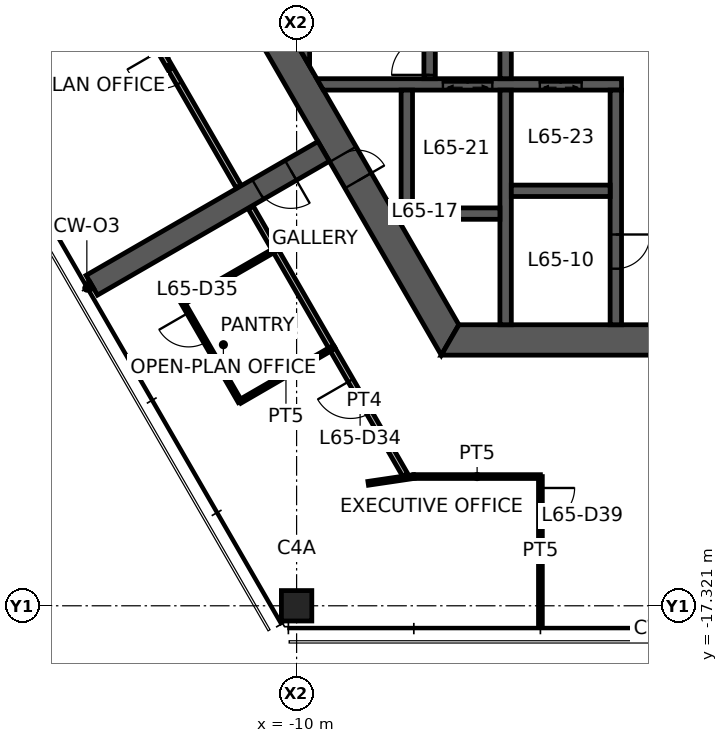
"""IFC4 building model, lengths in metres.
Left out: names, types, materials, properties, quantities, classifications, styles, units other than length and angle.
Written with IfcOpenShell. Run it as: python <this file> out.ifc"""

import sys

from ifc_helpers import new_model, si_unit, direction, frame, frame_2d, origin, origin_2d, place, context, subcontext, project, spatial, polyline, rectangle, hollow_rectangle, outline, extrude, element, fill, save


model = new_model("IFC4")
c1 = context("Model", 3, precision=1e-05, world=origin(), true_north=direction((0.0, 1.0)))
c2 = subcontext(c1, "Body", "Model", "MODEL_VIEW")
j1 = project(units=[si_unit("LENGTHUNIT", "METRE"), si_unit("PLANEANGLEUNIT", "RADIAN")], contexts=[c1])
p1 = place(None, origin())
s1 = spatial("IfcSite", under=j1, at=p1, CompositionType="ELEMENT")
p2 = place(p1, origin())
s2 = spatial("IfcBuilding", under=s1, at=p2, CompositionType="ELEMENT")
p3 = place(p2, frame((0.0, 0.0, 259.6)))
s3 = spatial("IfcBuildingStorey", under=s2, at=p3, CompositionType="ELEMENT", Elevation=259.6)
p4 = place(p3, frame((-10.0, -17.321, 0.0), z_axis=(0.0, 0.0, 1.0), x_axis=(1.0, 0.0, 0.0)))
e1 = element("IfcColumn", 1, at=p4, inside=s3, PredefinedType="COLUMN", context=c2, shape_type="SweptSolid", body=[
    extrude(hollow_rectangle(XDim=0.8, YDim=0.8, WallThickness=0.04, at=origin_2d()), origin(), (0.0, 0.0, 1.0), 3.9),
])
p5 = place(p3, frame((-11.922, 0.0, 0.0), z_axis=(0.0, 0.0, 1.0), x_axis=(0.500004296715, -0.866022923061, 0.0)))
e2 = element("IfcWall", 2, at=p5, inside=s3, PredefinedType="SHEAR", context=c2, shape_type="SweptSolid", body=[
    extrude(outline(polyline([(-0.231, -0.4), (6.281, -0.4), (7.081, -0.4), (12.153, -0.4), (11.691, 0.4), (7.081, 0.4), (6.281, 0.4), (0.231, 0.4), (-0.231, -0.4)])), origin(), (0.0, 0.0, 1.0), 3.9),
])
p6 = place(p5, frame((6.281, 0.0, 0.0)))
e3 = element("IfcOpeningElement", 3, at=p6, cuts=e2, PredefinedType="OPENING", context=c2, shape_type="SweptSolid", body=[
    extrude(rectangle(XDim=0.8, YDim=2.1, at=frame_2d((0.4, 1.05))), frame((0.0, 0.41, 0.0), z_axis=(0.0, -1.0, 0.0), x_axis=(1.0, 0.0, 0.0)), (0.0, 0.0, 1.0), 0.82),
])
p7 = place(p3, frame((-5.961, -10.325, 0.0), z_axis=(0.0, 0.0, 1.0), x_axis=(1.0, 0.0, 0.0)))
e4 = element("IfcWall", 4, at=p7, inside=s3, PredefinedType="SHEAR", context=c2, shape_type="SweptSolid", body=[
    extrude(outline(polyline([(-0.231, -0.4), (5.461, -0.4), (6.461, -0.4), (12.153, -0.4), (11.691, 0.4), (6.461, 0.4), (5.461, 0.4), (0.231, 0.4), (-0.231, -0.4)])), origin(), (0.0, 0.0, 1.0), 3.9),
])
p8 = place(p7, frame((5.461, 0.0, 0.0)))
e5 = element("IfcOpeningElement", 5, at=p8, cuts=e4, PredefinedType="OPENING", context=c2, shape_type="SweptSolid", body=[
    extrude(rectangle(XDim=1.0, YDim=2.1, at=frame_2d((0.5, 1.05))), frame((0.0, 0.41, 0.0), z_axis=(0.0, -1.0, 0.0), x_axis=(1.0, 0.0, 0.0)), (0.0, 0.0, 1.0), 0.82),
])
p9 = place(p3, frame((-9.288, -5.363, 0.0), z_axis=(0.0, 0.0, 1.0), x_axis=(-0.866027473358, -0.499996415376, 0.0)))
e6 = element("IfcWall", 6, at=p9, inside=s3, PredefinedType="SHEAR", context=c2, shape_type="SweptSolid", body=[
    extrude(rectangle(XDim=7.045, YDim=0.6, at=frame_2d((3.523, 0.0))), origin(), (0.0, 0.0, 1.0), 3.9),
])
p10 = place(p9, frame((1.0, 0.0, 0.0)))
e7 = element("IfcOpeningElement", 7, at=p10, cuts=e6, PredefinedType="OPENING", context=c2, shape_type="SweptSolid", body=[
    extrude(rectangle(XDim=1.0, YDim=2.1, at=frame_2d((0.5, 1.05))), frame((0.0, 0.31, 0.0), z_axis=(0.0, -1.0, 0.0), x_axis=(1.0, 0.0, 0.0)), (0.0, 0.0, 1.0), 0.62),
])
p11 = place(p3, frame((-9.382, -3.6, 0.0), z_axis=(0.0, 0.0, 1.0), x_axis=(1.0, 0.0, 0.0)))
e8 = element("IfcWall", 8, at=p11, inside=s3, PredefinedType="SHEAR", context=c2, shape_type="SweptSolid", body=[
    extrude(outline(polyline([(0.087, -0.15), (3.232, -0.15), (4.532, -0.15), (5.782, -0.15), (6.882, -0.15), (7.932, -0.15), (7.932, 0.15), (6.882, 0.15), (5.782, 0.15), (4.532, 0.15), (3.232, 0.15), (-0.087, 0.15), (0.087, -0.15)])), origin(), (0.0, 0.0, 1.0), 3.9),
])
p12 = place(p11, frame((5.782, 0.0, 0.0)))
e9 = element("IfcOpeningElement", 9, at=p12, cuts=e8, PredefinedType="OPENING", context=c2, shape_type="SweptSolid", body=[
    extrude(rectangle(XDim=1.1, YDim=2.1, at=frame_2d((0.55, 1.05))), frame((0.0, 0.16, 0.0), z_axis=(0.0, -1.0, 0.0), x_axis=(1.0, 0.0, 0.0)), (0.0, 0.0, 1.0), 0.32),
])
p13 = place(p11, frame((3.232, 0.0, 0.0)))
e10 = element("IfcOpeningElement", 10, at=p13, cuts=e8, PredefinedType="OPENING", context=c2, shape_type="SweptSolid", body=[
    extrude(rectangle(XDim=1.3, YDim=2.1, at=frame_2d((0.65, 1.05))), frame((0.0, 0.16, 0.0), z_axis=(0.0, -1.0, 0.0), x_axis=(1.0, 0.0, 0.0)), (0.0, 0.0, 1.0), 0.32),
])
p14 = place(p3, frame((-1.6, -3.75, 0.0), z_axis=(0.0, 0.0, 1.0), x_axis=(0.0, -1.0, 0.0)))
e11 = element("IfcWall", 11, at=p14, inside=s3, PredefinedType="SHEAR", context=c2, shape_type="SweptSolid", body=[
    extrude(rectangle(XDim=6.175, YDim=0.3, at=frame_2d((3.087, 0.0))), origin(), (0.0, 0.0, 1.0), 3.9),
])
p15 = place(p14, frame((3.8, 0.0, 0.0)))
e12 = element("IfcOpeningElement", 12, at=p15, cuts=e11, PredefinedType="OPENING", context=c2, shape_type="SweptSolid", body=[
    extrude(rectangle(XDim=0.9, YDim=2.1, at=frame_2d((0.45, 1.05))), frame((0.0, 0.16, 0.0), z_axis=(0.0, -1.0, 0.0), x_axis=(1.0, 0.0, 0.0)), (0.0, 0.0, 1.0), 0.32),
])
p16 = place(p3, frame((-4.5, -3.45, 0.0), z_axis=(0.0, 0.0, 1.0), x_axis=(0.0, 1.0, 0.0)))
e13 = element("IfcWall", 13, at=p16, inside=s3, PredefinedType="SHEAR", context=c2, shape_type="SweptSolid", body=[
    extrude(rectangle(XDim=6.9, YDim=0.3, at=frame_2d((3.45, 0.0))), origin(), (0.0, 0.0, 1.0), 3.9),
])
p17 = place(p16, frame((2.95, 0.0, 0.0)))
e14 = element("IfcOpeningElement", 14, at=p17, cuts=e13, PredefinedType="OPENING", context=c2, shape_type="SweptSolid", body=[
    extrude(rectangle(XDim=1.0, YDim=2.1, at=frame_2d((0.5, 1.05))), frame((0.0, 0.16, 0.0), z_axis=(0.0, -1.0, 0.0), x_axis=(1.0, 0.0, 0.0)), (0.0, 0.0, 1.0), 0.32),
])
p18 = place(p3, frame((-6.5, -3.45, 0.0), z_axis=(0.0, 0.0, 1.0), x_axis=(0.0, 1.0, 0.0)))
e15 = element("IfcWall", 15, at=p18, inside=s3, PredefinedType="SHEAR", context=c2, shape_type="SweptSolid", body=[
    extrude(rectangle(XDim=6.9, YDim=0.3, at=frame_2d((3.45, 0.0))), origin(), (0.0, 0.0, 1.0), 3.9),
])
p19 = place(p18, frame((0.1, 0.0, 0.0)))
e16 = element("IfcOpeningElement", 16, at=p19, cuts=e15, PredefinedType="OPENING", context=c2, shape_type="SweptSolid", body=[
    extrude(rectangle(XDim=1.0, YDim=2.1, at=frame_2d((0.5, 1.05))), frame((0.0, 0.16, 0.0), z_axis=(0.0, -1.0, 0.0), x_axis=(1.0, 0.0, 0.0)), (0.0, 0.0, 1.0), 0.32),
])
p20 = place(p3, frame((-4.5, -3.75, 0.0), z_axis=(0.0, 0.0, 1.0), x_axis=(0.0, -1.0, 0.0)))
e17 = element("IfcWall", 17, at=p20, inside=s3, PredefinedType="SHEAR", context=c2, shape_type="SweptSolid", body=[
    extrude(rectangle(XDim=6.175, YDim=0.3, at=frame_2d((3.087, 0.0))), origin(), (0.0, 0.0, 1.0), 3.9),
])
for number, where, z_axis, x_axis in (
    (18, (-4.35, -6.4, 0.0), (0.0, 0.0, 1.0), (1.0, 0.0, 0.0)),
    (19, (-7.25, -7.0, 0.0), (0.0, 0.0, 1.0), (1.0, 0.0, 0.0)),
):
    element("IfcWall", number, at=place(p3, frame(where, z_axis=z_axis, x_axis=x_axis)), inside=s3, PredefinedType="SHEAR", context=c2, shape_type="SweptSolid", body=[
        extrude(rectangle(XDim=2.6, YDim=0.3, at=frame_2d((1.3, 0.0))), origin(), (0.0, 0.0, 1.0), 3.9),
    ])
p21 = place(p3, frame((-7.1, -3.75, 0.0), z_axis=(0.0, 0.0, 1.0), x_axis=(0.0, -1.0, 0.0)))
e20 = element("IfcWall", 20, at=p21, inside=s3, PredefinedType="SHEAR", context=c2, shape_type="SweptSolid", body=[
    extrude(rectangle(XDim=3.1, YDim=0.3, at=frame_2d((1.55, 0.0))), origin(), (0.0, 0.0, 1.0), 3.9),
])
p22 = place(p3, frame((-9.808, -2.862, 0.0), z_axis=(0.0, 0.0, 1.0), x_axis=(0.0, 1.0, 0.0)))
e21 = element("IfcWall", 21, at=p22, inside=s3, PredefinedType="SHEAR", context=c2, shape_type="SweptSolid", body=[
    extrude(outline(polyline([(-0.26, -0.15), (5.984, -0.15), (5.465, 0.15), (0.26, 0.15), (-0.26, -0.15)])), origin(), (0.0, 0.0, 1.0), 3.9),
])
p23 = place(p3, frame((-11.527, -6.285, 0.0), z_axis=(0.0, 0.0, 1.0), x_axis=(-0.500002959843, 0.866023694911, 0.0)))
e22 = element("IfcWall", 22, at=p23, inside=s3, PredefinedType="PARTITIONING", context=c2, shape_type="SweptSolid", body=[
    extrude(rectangle(XDim=7.258, YDim=0.15, at=frame_2d((3.629, 0.0))), origin(), (0.0, 0.0, 1.0), 2.95),
])
p24 = place(p23, frame((3.129, 0.0, 0.0)))
e23 = element("IfcOpeningElement", 23, at=p24, cuts=e22, PredefinedType="OPENING", context=c2, shape_type="SweptSolid", body=[
    extrude(rectangle(XDim=1.0, YDim=2.1, at=frame_2d((0.5, 1.05))), frame((0.0, 0.085, 0.0), z_axis=(0.0, -1.0, 0.0), x_axis=(1.0, 0.0, 0.0)), (0.0, 0.0, 1.0), 0.17),
])
p25 = place(p3, frame((-9.064, -10.551, 0.0), z_axis=(0.0, 0.0, 1.0), x_axis=(-0.499977562641, 0.866038357612, 0.0)))
e24 = element("IfcWall", 24, at=p25, inside=s3, PredefinedType="PARTITIONING", context=c2, shape_type="SweptSolid", body=[
    extrude(rectangle(XDim=3.01, YDim=0.15, at=frame_2d((1.505, 0.0))), origin(), (0.0, 0.0, 1.0), 2.95),
])
p26 = place(p3, frame((-10.564, -7.952, 0.0), z_axis=(0.0, 0.0, 1.0), x_axis=(-0.500084415177, 0.865976661173, 0.0)))
e25 = element("IfcWall", 25, at=p26, inside=s3, PredefinedType="PARTITIONING", context=c2, shape_type="SweptSolid", body=[
    extrude(rectangle(XDim=1.284, YDim=0.15, at=frame_2d((0.642, 0.0))), origin(), (0.0, 0.0, 1.0), 2.95),
])
p27 = place(p3, frame((-7.144, -13.876, 0.0), z_axis=(0.0, 0.0, 1.0), x_axis=(-0.499993312796, 0.866029264609, 0.0)))
e26 = element("IfcWall", 26, at=p27, inside=s3, PredefinedType="PARTITIONING", context=c2, shape_type="SweptSolid", body=[
    extrude(rectangle(XDim=3.849, YDim=0.15, at=frame_2d((1.925, 0.0))), origin(), (0.0, 0.0, 1.0), 2.95),
])
p28 = place(p27, frame((1.869, 0.0, 0.0)))
e27 = element("IfcOpeningElement", 27, at=p28, cuts=e26, PredefinedType="OPENING", context=c2, shape_type="SweptSolid", body=[
    extrude(rectangle(XDim=1.0, YDim=2.1, at=frame_2d((0.5, 1.05))), frame((0.0, 0.085, 0.0), z_axis=(0.0, -1.0, 0.0), x_axis=(1.0, 0.0, 0.0)), (0.0, 0.0, 1.0), 0.17),
])
p29 = place(p3, frame((-12.991, -9.348, 0.0), z_axis=(0.0, 0.0, 1.0), x_axis=(0.866817750494, 0.498625097071, 0.0)))
e28 = element("IfcWall", 28, at=p29, inside=s3, PredefinedType="PARTITIONING", context=c2, shape_type="SweptSolid", body=[
    extrude(rectangle(XDim=2.8, YDim=0.1, at=frame_2d((1.4, 0.0))), origin(), (0.0, 0.0, 1.0), 2.95),
])
p30 = place(p3, frame((-11.491, -11.946, 0.0), z_axis=(0.0, 0.0, 1.0), x_axis=(-0.499990139034, 0.866031096941, 0.0)))
e29 = element("IfcWall", 29, at=p30, inside=s3, PredefinedType="PARTITIONING", context=c2, shape_type="SweptSolid", body=[
    extrude(rectangle(XDim=3.0, YDim=0.1, at=frame_2d((1.5, 0.0))), origin(), (0.0, 0.0, 1.0), 2.95),
])
p31 = place(p30, frame((1.8, 0.0, 0.0)))
e30 = element("IfcOpeningElement", 30, at=p31, cuts=e29, PredefinedType="OPENING", context=c2, shape_type="SweptSolid", body=[
    extrude(rectangle(XDim=0.9, YDim=2.1, at=frame_2d((0.45, 1.05))), frame((0.0, 0.06, 0.0), z_axis=(0.0, -1.0, 0.0), x_axis=(1.0, 0.0, 0.0)), (0.0, 0.0, 1.0), 0.12),
])
p32 = place(p3, frame((-9.069, -10.542, 0.0), z_axis=(0.0, 0.0, 1.0), x_axis=(-0.865195372903, -0.501434907746, 0.0)))
e31 = element("IfcWall", 31, at=p32, inside=s3, PredefinedType="PARTITIONING", context=c2, shape_type="SweptSolid", body=[
    extrude(rectangle(XDim=2.8, YDim=0.1, at=frame_2d((1.4, 0.0))), origin(), (0.0, 0.0, 1.0), 2.95),
])
p33 = place(p3, frame((-8.116, -14.098, 0.0), z_axis=(0.0, 0.0, 1.0), x_axis=(0.989162387444, 0.146825649214, 0.0)))
e32 = element("IfcWall", 32, at=p33, inside=s3, PredefinedType="PARTITIONING", context=c2, shape_type="SweptSolid", body=[
    extrude(rectangle(XDim=1.214, YDim=0.1, at=frame_2d((0.607, 0.0))), origin(), (0.0, 0.0, 1.0), 2.95),
])
p34 = place(p3, frame((-6.916, -13.919, 0.0), z_axis=(0.0, 0.0, 1.0), x_axis=(0.999999957026, -0.000293169146, 0.0)))
e33 = element("IfcWall", 33, at=p34, inside=s3, PredefinedType="PARTITIONING", context=c2, shape_type="SweptSolid", body=[
    extrude(rectangle(XDim=3.331, YDim=0.1, at=frame_2d((1.666, 0.0))), origin(), (0.0, 0.0, 1.0), 2.95),
])
p35 = place(p3, frame((-3.584, -13.92, 0.0), z_axis=(0.0, 0.0, 1.0), x_axis=(0.0, -1.0, 0.0)))
e34 = element("IfcWall", 34, at=p35, inside=s3, PredefinedType="PARTITIONING", context=c2, shape_type="SweptSolid", body=[
    extrude(rectangle(XDim=3.935, YDim=0.1, at=frame_2d((1.968, 0.0))), origin(), (0.0, 0.0, 1.0), 2.95),
])
p36 = place(p35, frame((0.3, 0.0, 0.0)))
e35 = element("IfcOpeningElement", 35, at=p36, cuts=e34, PredefinedType="OPENING", context=c2, shape_type="SweptSolid", body=[
    extrude(rectangle(XDim=0.9, YDim=2.1, at=frame_2d((0.45, 1.05))), frame((0.0, 0.06, 0.0), z_axis=(0.0, -1.0, 0.0), x_axis=(1.0, 0.0, 0.0)), (0.0, 0.0, 1.0), 0.12),
])
p37 = place(p3, frame((-15.39, -8.885, 0.0), z_axis=(0.0, 0.0, 1.0), x_axis=(-0.866472036435, -0.499225610396, 0.0)))
e36 = element("IfcWall", 36, at=p37, inside=s3, PredefinedType="PARTITIONING", context=c2, shape_type="SweptSolid", body=[
    extrude(rectangle(XDim=0.085, YDim=0.175, at=frame_2d((0.042, 0.0))), origin(), (0.0, 0.0, 1.0), 3.9),
])
p38 = place(p6, origin())
e37 = element("IfcDoor", 37, at=p38, inside=s3, OperationType="SINGLE_SWING_RIGHT", PredefinedType="DOOR", context=c2, shape_type="SweptSolid", body=[
    extrude(rectangle(XDim=0.8, YDim=2.1, at=frame_2d((0.4, 1.05))), frame((0.0, 0.025, 0.0), z_axis=(0.0, -1.0, 0.0), x_axis=(1.0, 0.0, 0.0)), (0.0, 0.0, 1.0), 0.05),
])
fill(e3, e37)
p39 = place(p19, origin())
e38 = element("IfcDoor", 38, at=p39, inside=s3, OperationType="SINGLE_SWING_LEFT", PredefinedType="DOOR", context=c2, shape_type="SweptSolid", body=[
    extrude(rectangle(XDim=1.0, YDim=2.1, at=frame_2d((0.5, 1.05))), frame((0.0, 0.025, 0.0), z_axis=(0.0, -1.0, 0.0), x_axis=(1.0, 0.0, 0.0)), (0.0, 0.0, 1.0), 0.05),
])
fill(e16, e38)
p40 = place(p15, origin())
e39 = element("IfcDoor", 39, at=p40, inside=s3, OperationType="SINGLE_SWING_LEFT", PredefinedType="DOOR", context=c2, shape_type="SweptSolid", body=[
    extrude(rectangle(XDim=0.9, YDim=2.1, at=frame_2d((0.45, 1.05))), frame((0.0, 0.025, 0.0), z_axis=(0.0, -1.0, 0.0), x_axis=(1.0, 0.0, 0.0)), (0.0, 0.0, 1.0), 0.05),
])
fill(e12, e39)
p41 = place(p10, origin())
e40 = element("IfcDoor", 40, at=p41, inside=s3, OperationType="SINGLE_SWING_LEFT", PredefinedType="DOOR", context=c2, shape_type="SweptSolid", body=[
    extrude(rectangle(XDim=1.0, YDim=2.1, at=frame_2d((0.5, 1.05))), frame((0.0, 0.025, 0.0), z_axis=(0.0, -1.0, 0.0), x_axis=(1.0, 0.0, 0.0)), (0.0, 0.0, 1.0), 0.05),
])
fill(e7, e40)
p42 = place(p24, origin())
e41 = element("IfcDoor", 41, at=p42, inside=s3, OperationType="SINGLE_SWING_RIGHT", PredefinedType="DOOR", context=c2, shape_type="SweptSolid", body=[
    extrude(rectangle(XDim=1.0, YDim=2.1, at=frame_2d((0.5, 1.05))), frame((0.0, 0.025, 0.0), z_axis=(0.0, -1.0, 0.0), x_axis=(1.0, 0.0, 0.0)), (0.0, 0.0, 1.0), 0.05),
])
fill(e23, e41)
p43 = place(p28, origin())
e42 = element("IfcDoor", 42, at=p43, inside=s3, OperationType="SINGLE_SWING_RIGHT", PredefinedType="DOOR", context=c2, shape_type="SweptSolid", body=[
    extrude(rectangle(XDim=1.0, YDim=2.1, at=frame_2d((0.5, 1.05))), frame((0.0, 0.025, 0.0), z_axis=(0.0, -1.0, 0.0), x_axis=(1.0, 0.0, 0.0)), (0.0, 0.0, 1.0), 0.05),
])
fill(e27, e42)
p44 = place(p31, origin())
e43 = element("IfcDoor", 43, at=p44, inside=s3, OperationType="SINGLE_SWING_RIGHT", PredefinedType="DOOR", context=c2, shape_type="SweptSolid", body=[
    extrude(rectangle(XDim=0.9, YDim=2.1, at=frame_2d((0.45, 1.05))), frame((0.0, 0.025, 0.0), z_axis=(0.0, -1.0, 0.0), x_axis=(1.0, 0.0, 0.0)), (0.0, 0.0, 1.0), 0.05),
])
fill(e30, e43)
p45 = place(p36, origin())
e44 = element("IfcDoor", 44, at=p45, inside=s3, OperationType="SINGLE_SWING_LEFT", PredefinedType="DOOR", context=c2, shape_type="SweptSolid", body=[
    extrude(rectangle(XDim=0.9, YDim=2.1, at=frame_2d((0.45, 1.05))), frame((0.0, 0.025, 0.0), z_axis=(0.0, -1.0, 0.0), x_axis=(1.0, 0.0, 0.0)), (0.0, 0.0, 1.0), 0.05),
])
fill(e35, e44)
p46 = place(p12, origin())
e45 = element("IfcDoor", 45, at=p46, inside=s3, OperationType="DOUBLE_DOOR_SLIDING", PredefinedType="DOOR", context=c2, shape_type="SweptSolid", body=[
    extrude(rectangle(XDim=1.1, YDim=2.1, at=frame_2d((0.55, 1.05))), frame((0.0, 0.025, 0.0), z_axis=(0.0, -1.0, 0.0), x_axis=(1.0, 0.0, 0.0)), (0.0, 0.0, 1.0), 0.05),
])
fill(e9, e45)
p47 = place(p13, origin())
e46 = element("IfcDoor", 46, at=p47, inside=s3, OperationType="DOUBLE_DOOR_SLIDING", PredefinedType="DOOR", context=c2, shape_type="SweptSolid", body=[
    extrude(rectangle(XDim=1.3, YDim=2.1, at=frame_2d((0.65, 1.05))), frame((0.0, 0.025, 0.0), z_axis=(0.0, -1.0, 0.0), x_axis=(1.0, 0.0, 0.0)), (0.0, 0.0, 1.0), 0.05),
])
fill(e10, e46)
save(model, sys.argv[1])
